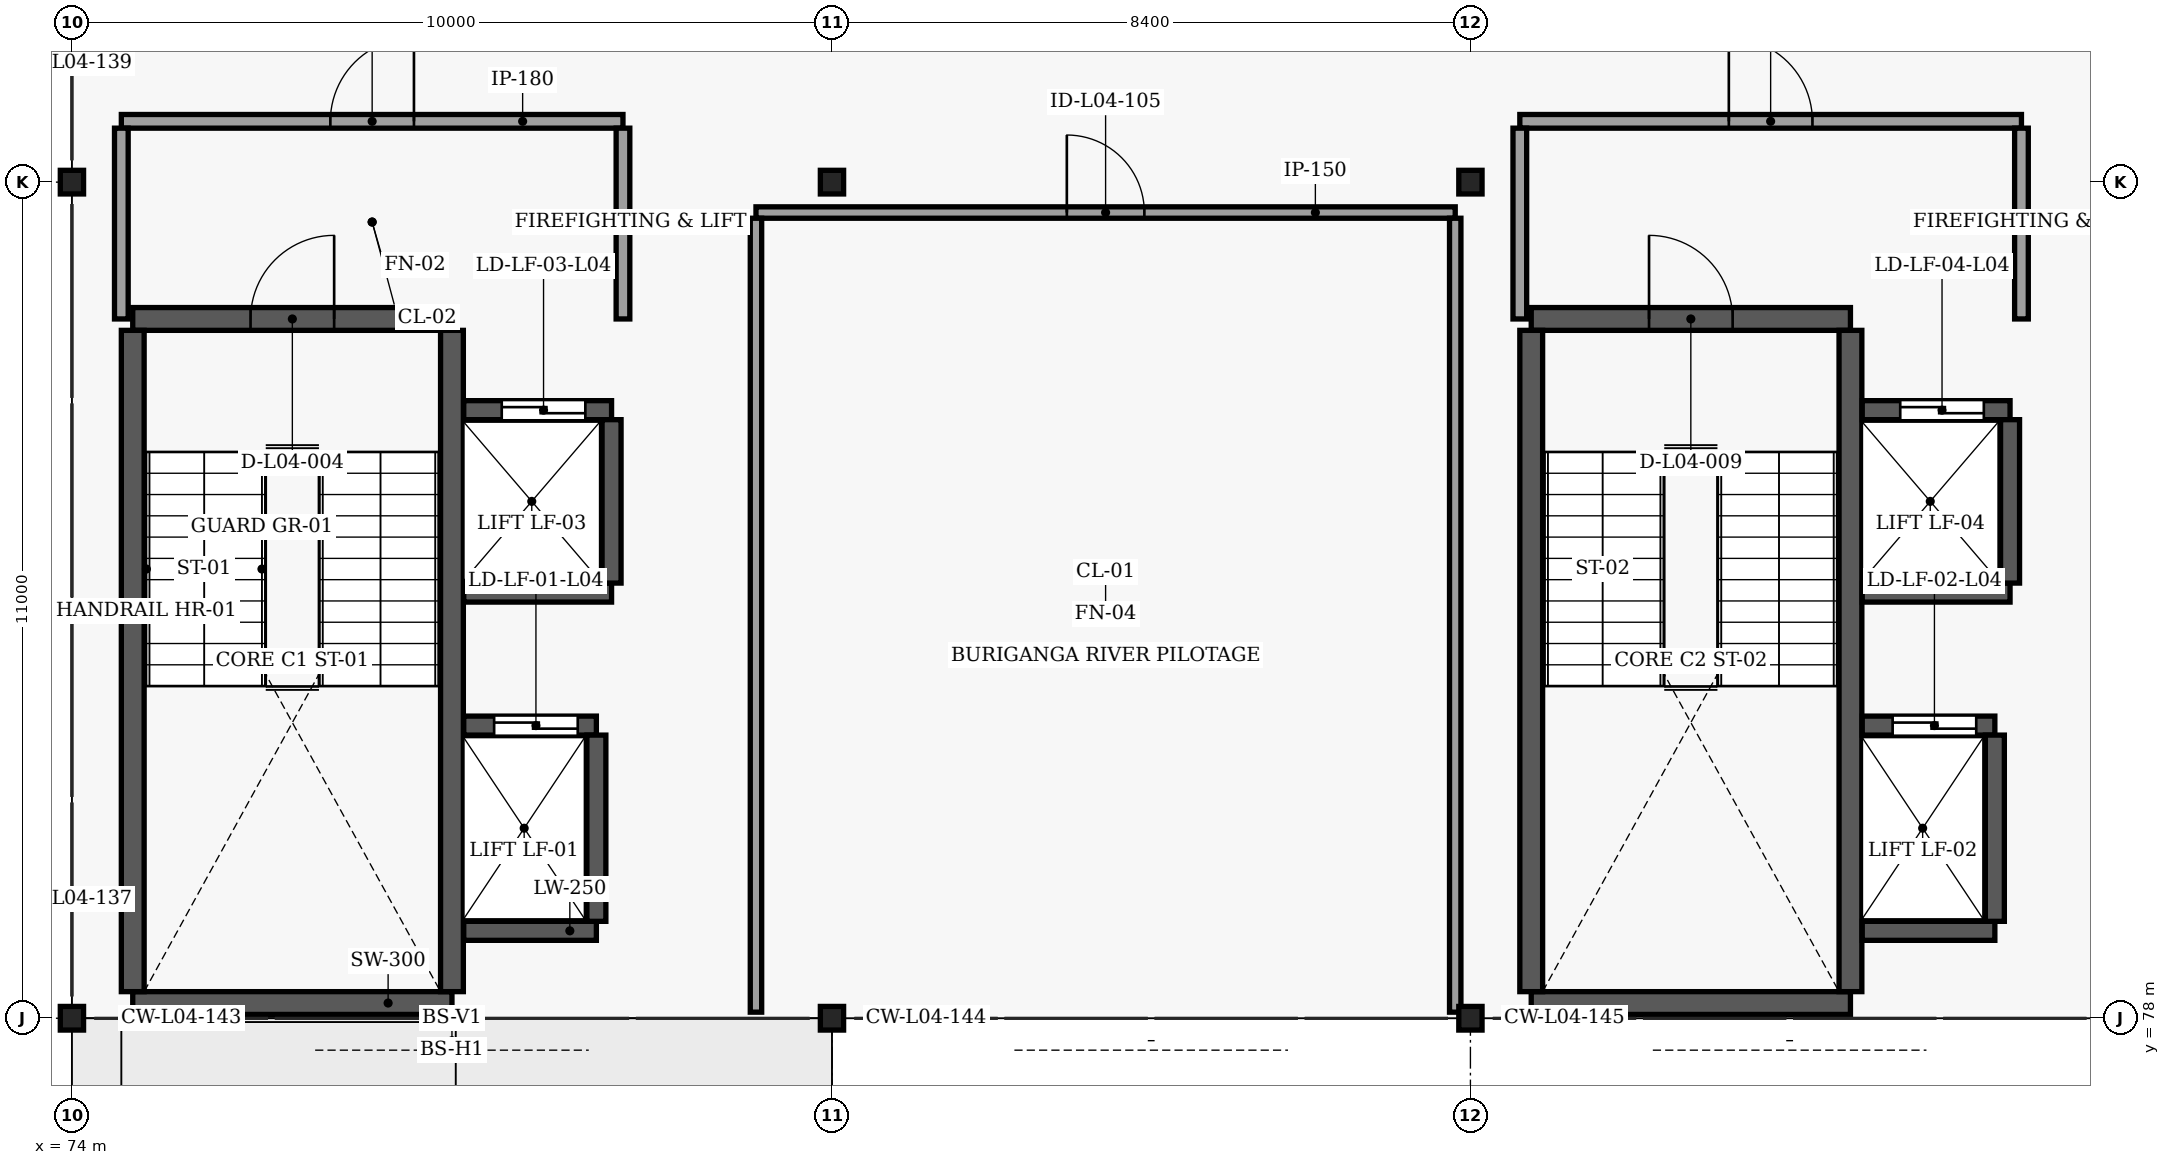
"""IFC4 building model, lengths in metres.
Left out: names, types, materials, properties, quantities, classifications, styles, units other than length and angle.
Written with IfcOpenShell. Run it as: python <this file> out.ifc"""

import sys

from ifc_helpers import new_model, si_unit, direction, frame, frame_2d, origin, origin_2d, place, context, subcontext, project, spatial, rectangle, i_section, extrude, element, fill, save


model = new_model("IFC4")
c1 = context("Model", 3, precision=1e-05, world=origin(), true_north=direction((0.0, 1.0)))
c2 = subcontext(c1, "Body", "Model", "MODEL_VIEW")
j1 = project(units=[si_unit("LENGTHUNIT", "METRE"), si_unit("PLANEANGLEUNIT", "RADIAN")], contexts=[c1])
p1 = place(None, origin())
s1 = spatial("IfcSite", under=j1, at=p1, CompositionType="ELEMENT")
p2 = place(p1, origin())
s2 = spatial("IfcBuilding", under=s1, at=p2, CompositionType="ELEMENT")
p3 = place(p2, frame((0.0, 0.0, 14.4)))
s3 = spatial("IfcBuildingStorey", under=s2, at=p3, CompositionType="ELEMENT", Elevation=14.4)
for number, where, z_axis, x_axis in (
    (1, (74.0, 78.0, 0.0), (0.0, 0.0, 1.0), (1.0, 0.0, 0.0)),
    (2, (84.0, 78.0, 0.0), (0.0, 0.0, 1.0), (1.0, 0.0, 0.0)),
    (3, (92.4, 78.0, 0.0), (0.0, 0.0, 1.0), (1.0, 0.0, 0.0)),
    (4, (74.0, 89.0, 0.0), (0.0, 0.0, 1.0), (1.0, 0.0, 0.0)),
    (5, (84.0, 89.0, 0.0), (0.0, 0.0, 1.0), (1.0, 0.0, 0.0)),
    (6, (92.4, 89.0, 0.0), (0.0, 0.0, 1.0), (1.0, 0.0, 0.0)),
):
    element("IfcColumn", number, at=place(p3, frame(where, z_axis=z_axis, x_axis=x_axis)), inside=s3, PredefinedType="COLUMN", context=c2, shape_type="SweptSolid", body=[
        extrude(i_section(OverallWidth=0.306, OverallDepth=0.311, WebThickness=0.011, FlangeThickness=0.017, FilletRadius=0.015, at=origin_2d()), origin(), (0.0, 0.0, 1.0), 3.95),
    ])
p4 = place(p3, frame((74.8, 78.2, 0.0), z_axis=(0.0, 0.0, 1.0), x_axis=(1.0, 0.0, 0.0)))
e7 = element("IfcWall", 7, at=p4, inside=s3, PredefinedType="SHEAR", context=c2, shape_type="SweptSolid", body=[
    extrude(rectangle(XDim=4.2, YDim=0.3, at=frame_2d((2.1, 0.0))), origin(), (0.0, 0.0, 1.0), 3.95),
])
p5 = place(p3, frame((74.8, 87.2, 0.0), z_axis=(0.0, 0.0, 1.0), x_axis=(1.0, 0.0, 0.0)))
e8 = element("IfcWall", 8, at=p5, inside=s3, PredefinedType="SHEAR", context=c2, shape_type="SweptSolid", body=[
    extrude(rectangle(XDim=4.2, YDim=0.3, at=frame_2d((2.1, 0.0))), origin(), (0.0, 0.0, 1.0), 3.95),
])
p6 = place(p5, frame((1.55, 0.0, 0.0)))
e9 = element("IfcOpeningElement", 9, at=p6, cuts=e8, PredefinedType="OPENING", context=c2, shape_type="SweptSolid", body=[
    extrude(rectangle(XDim=1.1, YDim=2.2, at=frame_2d((0.55, 1.1))), frame((0.0, 0.16, 0.0), z_axis=(0.0, -1.0, 0.0), x_axis=(1.0, 0.0, 0.0)), (0.0, 0.0, 1.0), 0.32),
])
for number, where, z_axis, x_axis in (
    (10, (74.8, 78.35, 0.0), (0.0, 0.0, 1.0), (0.0, 1.0, 0.0)),
    (11, (79.0, 78.35, 0.0), (0.0, 0.0, 1.0), (0.0, 1.0, 0.0)),
):
    element("IfcWall", number, at=place(p3, frame(where, z_axis=z_axis, x_axis=x_axis)), inside=s3, PredefinedType="SHEAR", context=c2, shape_type="SweptSolid", body=[
        extrude(rectangle(XDim=8.7, YDim=0.3, at=frame_2d((4.35, 0.0))), origin(), (0.0, 0.0, 1.0), 3.95),
    ])
p7 = place(p3, frame((79.155, 79.15, 0.0), z_axis=(0.0, 0.0, 1.0), x_axis=(1.0, 0.0, 0.0)))
e12 = element("IfcWall", 12, at=p7, inside=s3, PredefinedType="SOLIDWALL", context=c2, shape_type="SweptSolid", body=[
    extrude(rectangle(XDim=1.745, YDim=0.25, at=frame_2d((0.873, 0.0))), origin(), (0.0, 0.0, 1.0), 3.95),
])
p8 = place(p3, frame((79.155, 81.85, 0.0), z_axis=(0.0, 0.0, 1.0), x_axis=(1.0, 0.0, 0.0)))
e13 = element("IfcWall", 13, at=p8, inside=s3, PredefinedType="SOLIDWALL", context=c2, shape_type="SweptSolid", body=[
    extrude(rectangle(XDim=1.745, YDim=0.25, at=frame_2d((0.873, 0.0))), origin(), (0.0, 0.0, 1.0), 3.95),
])
p9 = place(p8, frame((0.4, 0.0, 0.0)))
e14 = element("IfcOpeningElement", 14, at=p9, cuts=e13, PredefinedType="OPENING", context=c2, shape_type="SweptSolid", body=[
    extrude(rectangle(XDim=1.1, YDim=2.2, at=frame_2d((0.55, 1.1))), frame((0.0, 0.135, 0.0), z_axis=(0.0, -1.0, 0.0), x_axis=(1.0, 0.0, 0.0)), (0.0, 0.0, 1.0), 0.27),
])
p10 = place(p3, frame((80.9, 79.275, 0.0), z_axis=(0.0, 0.0, 1.0), x_axis=(0.0, 1.0, 0.0)))
e15 = element("IfcWall", 15, at=p10, inside=s3, PredefinedType="SOLIDWALL", context=c2, shape_type="SweptSolid", body=[
    extrude(rectangle(XDim=2.45, YDim=0.25, at=frame_2d((1.225, 0.0))), origin(), (0.0, 0.0, 1.0), 3.95),
])
p11 = place(p3, frame((79.155, 83.6, 0.0), z_axis=(0.0, 0.0, 1.0), x_axis=(1.0, 0.0, 0.0)))
e16 = element("IfcWall", 16, at=p11, inside=s3, PredefinedType="SOLIDWALL", context=c2, shape_type="SweptSolid", body=[
    extrude(rectangle(XDim=1.945, YDim=0.25, at=frame_2d((0.973, 0.0))), origin(), (0.0, 0.0, 1.0), 3.95),
])
p12 = place(p3, frame((79.155, 86.0, 0.0), z_axis=(0.0, 0.0, 1.0), x_axis=(1.0, 0.0, 0.0)))
e17 = element("IfcWall", 17, at=p12, inside=s3, PredefinedType="SOLIDWALL", context=c2, shape_type="SweptSolid", body=[
    extrude(rectangle(XDim=1.945, YDim=0.25, at=frame_2d((0.973, 0.0))), origin(), (0.0, 0.0, 1.0), 3.95),
])
p13 = place(p12, frame((0.5, 0.0, 0.0)))
e18 = element("IfcOpeningElement", 18, at=p13, cuts=e17, PredefinedType="OPENING", context=c2, shape_type="SweptSolid", body=[
    extrude(rectangle(XDim=1.1, YDim=2.2, at=frame_2d((0.55, 1.1))), frame((0.0, 0.135, 0.0), z_axis=(0.0, -1.0, 0.0), x_axis=(1.0, 0.0, 0.0)), (0.0, 0.0, 1.0), 0.27),
])
p14 = place(p3, frame((81.1, 83.725, 0.0), z_axis=(0.0, 0.0, 1.0), x_axis=(0.0, 1.0, 0.0)))
e19 = element("IfcWall", 19, at=p14, inside=s3, PredefinedType="SOLIDWALL", context=c2, shape_type="SweptSolid", body=[
    extrude(rectangle(XDim=2.15, YDim=0.25, at=frame_2d((1.075, 0.0))), origin(), (0.0, 0.0, 1.0), 3.95),
])
p15 = place(p3, frame((93.2, 78.2, 0.0), z_axis=(0.0, 0.0, 1.0), x_axis=(1.0, 0.0, 0.0)))
e20 = element("IfcWall", 20, at=p15, inside=s3, PredefinedType="SHEAR", context=c2, shape_type="SweptSolid", body=[
    extrude(rectangle(XDim=4.2, YDim=0.3, at=frame_2d((2.1, 0.0))), origin(), (0.0, 0.0, 1.0), 3.95),
])
p16 = place(p3, frame((93.2, 87.2, 0.0), z_axis=(0.0, 0.0, 1.0), x_axis=(1.0, 0.0, 0.0)))
e21 = element("IfcWall", 21, at=p16, inside=s3, PredefinedType="SHEAR", context=c2, shape_type="SweptSolid", body=[
    extrude(rectangle(XDim=4.2, YDim=0.3, at=frame_2d((2.1, 0.0))), origin(), (0.0, 0.0, 1.0), 3.95),
])
p17 = place(p16, frame((1.55, 0.0, 0.0)))
e22 = element("IfcOpeningElement", 22, at=p17, cuts=e21, PredefinedType="OPENING", context=c2, shape_type="SweptSolid", body=[
    extrude(rectangle(XDim=1.1, YDim=2.2, at=frame_2d((0.55, 1.1))), frame((0.0, 0.16, 0.0), z_axis=(0.0, -1.0, 0.0), x_axis=(1.0, 0.0, 0.0)), (0.0, 0.0, 1.0), 0.32),
])
for number, where, z_axis, x_axis in (
    (23, (93.2, 78.35, 0.0), (0.0, 0.0, 1.0), (0.0, 1.0, 0.0)),
    (24, (97.4, 78.35, 0.0), (0.0, 0.0, 1.0), (0.0, 1.0, 0.0)),
):
    element("IfcWall", number, at=place(p3, frame(where, z_axis=z_axis, x_axis=x_axis)), inside=s3, PredefinedType="SHEAR", context=c2, shape_type="SweptSolid", body=[
        extrude(rectangle(XDim=8.7, YDim=0.3, at=frame_2d((4.35, 0.0))), origin(), (0.0, 0.0, 1.0), 3.95),
    ])
p18 = place(p3, frame((97.555, 79.15, 0.0), z_axis=(0.0, 0.0, 1.0), x_axis=(1.0, 0.0, 0.0)))
e25 = element("IfcWall", 25, at=p18, inside=s3, PredefinedType="SOLIDWALL", context=c2, shape_type="SweptSolid", body=[
    extrude(rectangle(XDim=1.745, YDim=0.25, at=frame_2d((0.873, 0.0))), origin(), (0.0, 0.0, 1.0), 3.95),
])
p19 = place(p3, frame((97.555, 81.85, 0.0), z_axis=(0.0, 0.0, 1.0), x_axis=(1.0, 0.0, 0.0)))
e26 = element("IfcWall", 26, at=p19, inside=s3, PredefinedType="SOLIDWALL", context=c2, shape_type="SweptSolid", body=[
    extrude(rectangle(XDim=1.745, YDim=0.25, at=frame_2d((0.873, 0.0))), origin(), (0.0, 0.0, 1.0), 3.95),
])
p20 = place(p19, frame((0.4, 0.0, 0.0)))
e27 = element("IfcOpeningElement", 27, at=p20, cuts=e26, PredefinedType="OPENING", context=c2, shape_type="SweptSolid", body=[
    extrude(rectangle(XDim=1.1, YDim=2.2, at=frame_2d((0.55, 1.1))), frame((0.0, 0.135, 0.0), z_axis=(0.0, -1.0, 0.0), x_axis=(1.0, 0.0, 0.0)), (0.0, 0.0, 1.0), 0.27),
])
p21 = place(p3, frame((99.3, 79.275, 0.0), z_axis=(0.0, 0.0, 1.0), x_axis=(0.0, 1.0, 0.0)))
e28 = element("IfcWall", 28, at=p21, inside=s3, PredefinedType="SOLIDWALL", context=c2, shape_type="SweptSolid", body=[
    extrude(rectangle(XDim=2.45, YDim=0.25, at=frame_2d((1.225, 0.0))), origin(), (0.0, 0.0, 1.0), 3.95),
])
p22 = place(p3, frame((97.555, 83.6, 0.0), z_axis=(0.0, 0.0, 1.0), x_axis=(1.0, 0.0, 0.0)))
e29 = element("IfcWall", 29, at=p22, inside=s3, PredefinedType="SOLIDWALL", context=c2, shape_type="SweptSolid", body=[
    extrude(rectangle(XDim=1.945, YDim=0.25, at=frame_2d((0.973, 0.0))), origin(), (0.0, 0.0, 1.0), 3.95),
])
p23 = place(p3, frame((97.555, 86.0, 0.0), z_axis=(0.0, 0.0, 1.0), x_axis=(1.0, 0.0, 0.0)))
e30 = element("IfcWall", 30, at=p23, inside=s3, PredefinedType="SOLIDWALL", context=c2, shape_type="SweptSolid", body=[
    extrude(rectangle(XDim=1.945, YDim=0.25, at=frame_2d((0.973, 0.0))), origin(), (0.0, 0.0, 1.0), 3.95),
])
p24 = place(p23, frame((0.5, 0.0, 0.0)))
e31 = element("IfcOpeningElement", 31, at=p24, cuts=e30, PredefinedType="OPENING", context=c2, shape_type="SweptSolid", body=[
    extrude(rectangle(XDim=1.1, YDim=2.2, at=frame_2d((0.55, 1.1))), frame((0.0, 0.135, 0.0), z_axis=(0.0, -1.0, 0.0), x_axis=(1.0, 0.0, 0.0)), (0.0, 0.0, 1.0), 0.27),
])
p25 = place(p3, frame((99.5, 83.725, 0.0), z_axis=(0.0, 0.0, 1.0), x_axis=(0.0, 1.0, 0.0)))
e32 = element("IfcWall", 32, at=p25, inside=s3, PredefinedType="SOLIDWALL", context=c2, shape_type="SweptSolid", body=[
    extrude(rectangle(XDim=2.15, YDim=0.25, at=frame_2d((1.075, 0.0))), origin(), (0.0, 0.0, 1.0), 3.95),
])
p26 = place(p3, frame((74.65, 89.8, 0.0), z_axis=(0.0, 0.0, 1.0), x_axis=(1.0, 0.0, 0.0)))
e33 = element("IfcWall", 33, at=p26, inside=s3, PredefinedType="SOLIDWALL", context=c2, shape_type="SweptSolid", body=[
    extrude(rectangle(XDim=6.6, YDim=0.18, at=frame_2d((3.3, 0.0))), origin(), (0.0, 0.0, 1.0), 3.9),
])
p27 = place(p26, frame((2.75, 0.0, 0.0)))
e34 = element("IfcOpeningElement", 34, at=p27, cuts=e33, PredefinedType="OPENING", context=c2, shape_type="SweptSolid", body=[
    extrude(rectangle(XDim=1.1, YDim=2.2, at=frame_2d((0.55, 1.1))), frame((0.0, 0.1, 0.0), z_axis=(0.0, -1.0, 0.0), x_axis=(1.0, 0.0, 0.0)), (0.0, 0.0, 1.0), 0.2),
])
for number, where, z_axis, x_axis in (
    (35, (74.65, 87.2, 0.0), (0.0, 0.0, 1.0), (0.0, 1.0, 0.0)),
    (36, (81.25, 87.2, 0.0), (0.0, 0.0, 1.0), (0.0, 1.0, 0.0)),
):
    element("IfcWall", number, at=place(p3, frame(where, z_axis=z_axis, x_axis=x_axis)), inside=s3, PredefinedType="SOLIDWALL", context=c2, shape_type="SweptSolid", body=[
        extrude(rectangle(XDim=2.51, YDim=0.18, at=frame_2d((1.255, 0.0))), origin(), (0.0, 0.0, 1.0), 3.533),
    ])
p28 = place(p3, frame((93.05, 89.8, 0.0), z_axis=(0.0, 0.0, 1.0), x_axis=(1.0, 0.0, 0.0)))
e37 = element("IfcWall", 37, at=p28, inside=s3, PredefinedType="SOLIDWALL", context=c2, shape_type="SweptSolid", body=[
    extrude(rectangle(XDim=6.6, YDim=0.18, at=frame_2d((3.3, 0.0))), origin(), (0.0, 0.0, 1.0), 3.9),
])
p29 = place(p28, frame((2.75, 0.0, 0.0)))
e38 = element("IfcOpeningElement", 38, at=p29, cuts=e37, PredefinedType="OPENING", context=c2, shape_type="SweptSolid", body=[
    extrude(rectangle(XDim=1.1, YDim=2.2, at=frame_2d((0.55, 1.1))), frame((0.0, 0.1, 0.0), z_axis=(0.0, -1.0, 0.0), x_axis=(1.0, 0.0, 0.0)), (0.0, 0.0, 1.0), 0.2),
])
for number, where, z_axis, x_axis in (
    (39, (93.05, 87.2, 0.0), (0.0, 0.0, 1.0), (0.0, 1.0, 0.0)),
    (40, (99.65, 87.2, 0.0), (0.0, 0.0, 1.0), (0.0, 1.0, 0.0)),
):
    element("IfcWall", number, at=place(p3, frame(where, z_axis=z_axis, x_axis=x_axis)), inside=s3, PredefinedType="SOLIDWALL", context=c2, shape_type="SweptSolid", body=[
        extrude(rectangle(XDim=2.51, YDim=0.18, at=frame_2d((1.255, 0.0))), origin(), (0.0, 0.0, 1.0), 3.533),
    ])
p30 = place(p3, frame((83.0, 88.6, 0.0), z_axis=(0.0, 0.0, 1.0), x_axis=(1.0, 0.0, 0.0)))
e41 = element("IfcWall", 41, at=p30, inside=s3, PredefinedType="PARTITIONING", context=c2, shape_type="SweptSolid", body=[
    extrude(rectangle(XDim=9.2, YDim=0.15, at=frame_2d((4.6, 0.0))), origin(), (0.0, 0.0, 1.0), 3.54),
])
p31 = place(p30, frame((4.09, 0.0, 0.0)))
e42 = element("IfcOpeningElement", 42, at=p31, cuts=e41, PredefinedType="OPENING", context=c2, shape_type="SweptSolid", body=[
    extrude(rectangle(XDim=1.02, YDim=2.2, at=frame_2d((0.51, 1.1))), frame((0.0, 0.085, 0.0), z_axis=(0.0, -1.0, 0.0), x_axis=(1.0, 0.0, 0.0)), (0.0, 0.0, 1.0), 0.17),
])
p32 = place(p3, frame((83.0, 78.08, 0.0), z_axis=(0.0, 0.0, 1.0), x_axis=(0.0, 1.0, 0.0)))
e43 = element("IfcWall", 43, at=p32, inside=s3, PredefinedType="PARTITIONING", context=c2, shape_type="SweptSolid", body=[
    extrude(rectangle(XDim=10.445, YDim=0.15, at=frame_2d((5.222, 0.0))), origin(), (0.0, 0.0, 1.0), 3.9),
])
p33 = place(p3, frame((92.2, 78.08, 0.0), z_axis=(0.0, 0.0, 1.0), x_axis=(0.0, 1.0, 0.0)))
e44 = element("IfcWall", 44, at=p33, inside=s3, PredefinedType="PARTITIONING", context=c2, shape_type="SweptSolid", body=[
    extrude(rectangle(XDim=10.445, YDim=0.15, at=frame_2d((5.222, 0.0))), origin(), (0.0, 0.0, 1.0), 3.54),
])
p34 = place(p6, origin())
e45 = element("IfcDoor", 45, at=p34, inside=s3, OperationType="SINGLE_SWING_RIGHT", PredefinedType="DOOR", context=c2, shape_type="SweptSolid", body=[
    extrude(rectangle(XDim=1.1, YDim=2.2, at=frame_2d((0.55, 1.1))), frame((0.0, 0.025, 0.0), z_axis=(0.0, -1.0, 0.0), x_axis=(1.0, 0.0, 0.0)), (0.0, 0.0, 1.0), 0.05),
])
fill(e9, e45)
p35 = place(p9, origin())
e46 = element("IfcDoor", 46, at=p35, inside=s3, OperationType="SLIDING_TO_LEFT", PredefinedType="DOOR", context=c2, shape_type="SweptSolid", body=[
    extrude(rectangle(XDim=1.1, YDim=2.2, at=frame_2d((0.55, 1.1))), frame((0.0, 0.025, 0.0), z_axis=(0.0, -1.0, 0.0), x_axis=(1.0, 0.0, 0.0)), (0.0, 0.0, 1.0), 0.05),
])
fill(e14, e46)
p36 = place(p13, origin())
e47 = element("IfcDoor", 47, at=p36, inside=s3, OperationType="SLIDING_TO_LEFT", PredefinedType="DOOR", context=c2, shape_type="SweptSolid", body=[
    extrude(rectangle(XDim=1.1, YDim=2.2, at=frame_2d((0.55, 1.1))), frame((0.0, 0.025, 0.0), z_axis=(0.0, -1.0, 0.0), x_axis=(1.0, 0.0, 0.0)), (0.0, 0.0, 1.0), 0.05),
])
fill(e18, e47)
p37 = place(p17, origin())
e48 = element("IfcDoor", 48, at=p37, inside=s3, OperationType="SINGLE_SWING_LEFT", PredefinedType="DOOR", context=c2, shape_type="SweptSolid", body=[
    extrude(rectangle(XDim=1.1, YDim=2.2, at=frame_2d((0.55, 1.1))), frame((0.0, 0.025, 0.0), z_axis=(0.0, -1.0, 0.0), x_axis=(1.0, 0.0, 0.0)), (0.0, 0.0, 1.0), 0.05),
])
fill(e22, e48)
p38 = place(p20, origin())
e49 = element("IfcDoor", 49, at=p38, inside=s3, OperationType="SLIDING_TO_LEFT", PredefinedType="DOOR", context=c2, shape_type="SweptSolid", body=[
    extrude(rectangle(XDim=1.1, YDim=2.2, at=frame_2d((0.55, 1.1))), frame((0.0, 0.025, 0.0), z_axis=(0.0, -1.0, 0.0), x_axis=(1.0, 0.0, 0.0)), (0.0, 0.0, 1.0), 0.05),
])
fill(e27, e49)
p39 = place(p24, origin())
e50 = element("IfcDoor", 50, at=p39, inside=s3, OperationType="SLIDING_TO_LEFT", PredefinedType="DOOR", context=c2, shape_type="SweptSolid", body=[
    extrude(rectangle(XDim=1.1, YDim=2.2, at=frame_2d((0.55, 1.1))), frame((0.0, 0.025, 0.0), z_axis=(0.0, -1.0, 0.0), x_axis=(1.0, 0.0, 0.0)), (0.0, 0.0, 1.0), 0.05),
])
fill(e31, e50)
p40 = place(p27, origin())
e51 = element("IfcDoor", 51, at=p40, inside=s3, OperationType="SINGLE_SWING_RIGHT", PredefinedType="DOOR", context=c2, shape_type="SweptSolid", body=[
    extrude(rectangle(XDim=1.1, YDim=2.2, at=frame_2d((0.55, 1.1))), frame((0.0, 0.025, 0.0), z_axis=(0.0, -1.0, 0.0), x_axis=(1.0, 0.0, 0.0)), (0.0, 0.0, 1.0), 0.05),
])
fill(e34, e51)
p41 = place(p29, origin())
e52 = element("IfcDoor", 52, at=p41, inside=s3, OperationType="SINGLE_SWING_LEFT", PredefinedType="DOOR", context=c2, shape_type="SweptSolid", body=[
    extrude(rectangle(XDim=1.1, YDim=2.2, at=frame_2d((0.55, 1.1))), frame((0.0, 0.025, 0.0), z_axis=(0.0, -1.0, 0.0), x_axis=(1.0, 0.0, 0.0)), (0.0, 0.0, 1.0), 0.05),
])
fill(e38, e52)
p42 = place(p31, origin())
e53 = element("IfcDoor", 53, at=p42, inside=s3, OperationType="SINGLE_SWING_LEFT", PredefinedType="DOOR", context=c2, shape_type="SweptSolid", body=[
    extrude(rectangle(XDim=1.02, YDim=2.2, at=frame_2d((0.51, 1.1))), frame((0.0, 0.025, 0.0), z_axis=(0.0, -1.0, 0.0), x_axis=(1.0, 0.0, 0.0)), (0.0, 0.0, 1.0), 0.05),
])
fill(e42, e53)
save(model, sys.argv[1])
